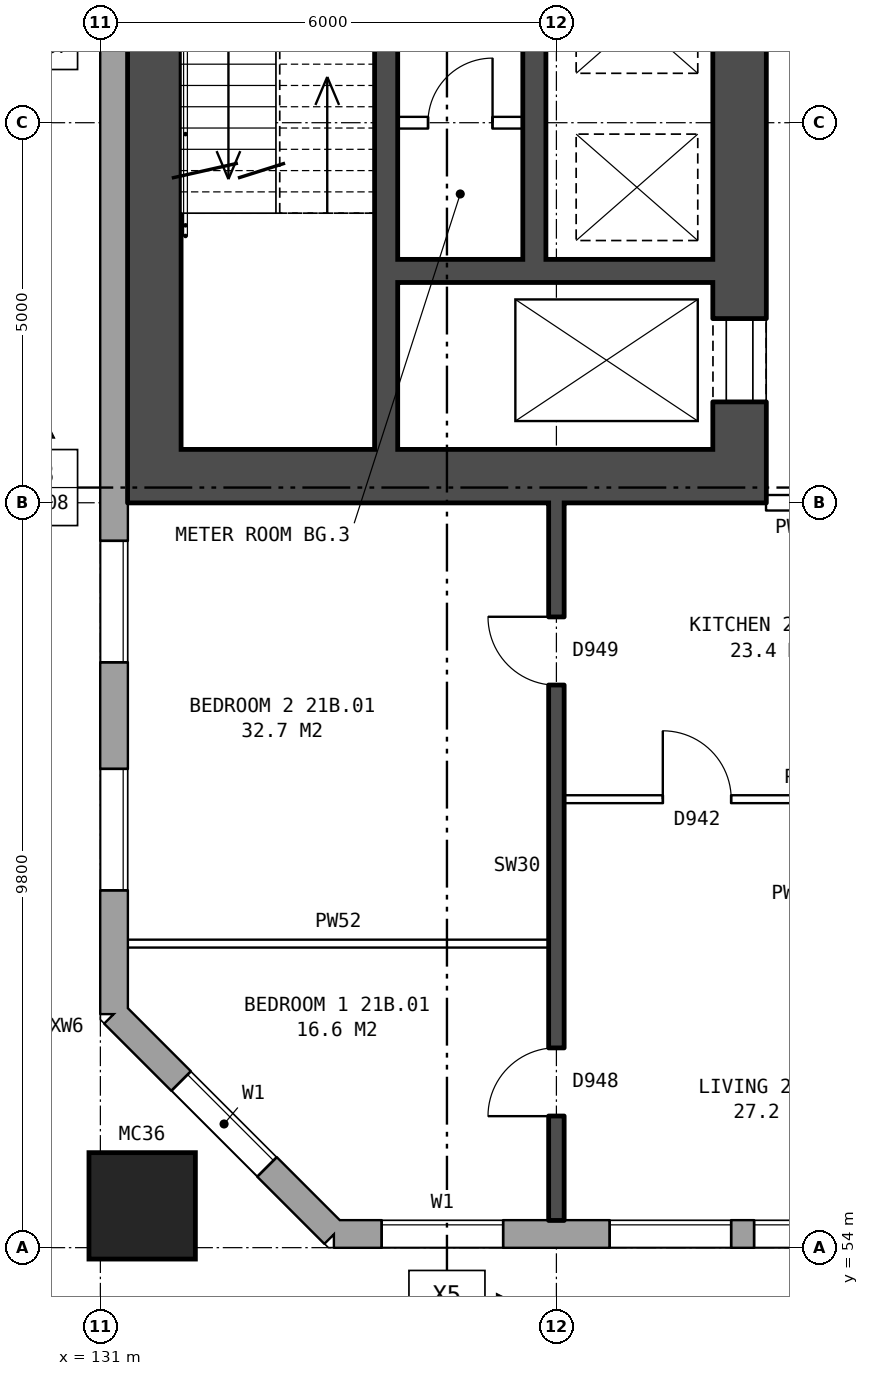
"""IFC4 building model, lengths in metres.
Left out: names, types, materials, properties, quantities, classifications, styles, units other than length and angle.
Written with IfcOpenShell. Run it as: python <this file> out.ifc"""

import sys

from ifc_helpers import new_model, si_unit, direction, frame, frame_2d, origin, origin_2d, place, context, subcontext, project, spatial, rectangle, hollow_rectangle, extrude, element, fill, save


model = new_model("IFC4")
c1 = context("Model", 3, precision=1e-05, world=origin(), true_north=direction((0.0, 1.0)))
c2 = subcontext(c1, "Body", "Model", "MODEL_VIEW")
j1 = project(units=[si_unit("LENGTHUNIT", "METRE"), si_unit("PLANEANGLEUNIT", "RADIAN")], contexts=[c1])
p1 = place(None, origin())
s1 = spatial("IfcSite", under=j1, at=p1, CompositionType="ELEMENT")
p2 = place(p1, origin())
s2 = spatial("IfcBuilding", under=s1, at=p2, CompositionType="ELEMENT")
p3 = place(p2, frame((0.0, 0.0, 77.8)))
s3 = spatial("IfcBuildingStorey", under=s2, at=p3, CompositionType="ELEMENT", Elevation=77.8)
p4 = place(p3, frame((131.55, 54.55, 0.0), z_axis=(0.0, 0.0, 1.0), x_axis=(1.0, 0.0, 0.0)))
e1 = element("IfcColumn", 1, at=p4, inside=s3, PredefinedType="COLUMN", context=c2, shape_type="SweptSolid", body=[
    extrude(hollow_rectangle(XDim=1.4, YDim=1.4, WallThickness=0.075, at=origin_2d()), origin(), (0.0, 0.0, 1.0), 3.1),
])
p5 = place(p3, frame((131.18, 57.075, 0.0), z_axis=(0.0, 0.0, 1.0), x_axis=(0.707106781187, -0.707106781187, 0.0)))
e2 = element("IfcWall", 2, at=p5, inside=s3, PredefinedType="STANDARD", context=c2, shape_type="SweptSolid", body=[
    extrude(rectangle(XDim=4.094, YDim=0.36, at=frame_2d((2.047, 0.0))), origin(), (0.0, 0.0, 1.0), 2.85),
])
p6 = place(p5, frame((1.247, 0.0, 0.8)))
e3 = element("IfcOpeningElement", 3, at=p6, cuts=e2, PredefinedType="OPENING", context=c2, shape_type="SweptSolid", body=[
    extrude(rectangle(XDim=1.6, YDim=1.8, at=frame_2d((0.8, 0.9))), frame((0.0, 0.19, 0.0), z_axis=(0.0, -1.0, 0.0), x_axis=(1.0, 0.0, 0.0)), (0.0, 0.0, 1.0), 0.38),
])
p7 = place(p3, frame((134.075, 54.18, 0.0), z_axis=(0.0, 0.0, 1.0), x_axis=(1.0, 0.0, 0.0)))
e4 = element("IfcWall", 4, at=p7, inside=s3, PredefinedType="STANDARD", context=c2, shape_type="SweptSolid", body=[
    extrude(rectangle(XDim=38.101, YDim=0.36, at=frame_2d((19.05, 0.0))), origin(), (0.0, 0.0, 1.0), 2.85),
])
p8 = place(p7, frame((0.625, 0.0, 0.8)))
e5 = element("IfcOpeningElement", 5, at=p8, cuts=e4, PredefinedType="OPENING", context=c2, shape_type="SweptSolid", body=[
    extrude(rectangle(XDim=1.6, YDim=1.8, at=frame_2d((0.8, 0.9))), frame((0.0, 0.19, 0.0), z_axis=(0.0, -1.0, 0.0), x_axis=(1.0, 0.0, 0.0)), (0.0, 0.0, 1.0), 0.38),
])
p9 = place(p7, frame((3.625, 0.0, 0.8)))
e6 = element("IfcOpeningElement", 6, at=p9, cuts=e4, PredefinedType="OPENING", context=c2, shape_type="SweptSolid", body=[
    extrude(rectangle(XDim=1.6, YDim=1.8, at=frame_2d((0.8, 0.9))), frame((0.0, 0.19, 0.0), z_axis=(0.0, -1.0, 0.0), x_axis=(1.0, 0.0, 0.0)), (0.0, 0.0, 1.0), 0.38),
])
p10 = place(p7, frame((5.525, 0.0, 0.8)))
e7 = element("IfcOpeningElement", 7, at=p10, cuts=e4, PredefinedType="OPENING", context=c2, shape_type="SweptSolid", body=[
    extrude(rectangle(XDim=1.6, YDim=1.8, at=frame_2d((0.8, 0.9))), frame((0.0, 0.19, 0.0), z_axis=(0.0, -1.0, 0.0), x_axis=(1.0, 0.0, 0.0)), (0.0, 0.0, 1.0), 0.38),
])
p11 = place(p7, frame((9.425, 0.0, 0.65)))
e8 = element("IfcOpeningElement", 8, at=p11, cuts=e4, PredefinedType="OPENING", context=c2, shape_type="SweptSolid", body=[
    extrude(rectangle(XDim=0.6, YDim=0.9, at=frame_2d((0.3, 0.45))), frame((0.0, 0.19, 0.0), z_axis=(0.0, -1.0, 0.0), x_axis=(1.0, 0.0, 0.0)), (0.0, 0.0, 1.0), 0.38),
])
p12 = place(p7, frame((12.625, 0.0, 0.8)))
e9 = element("IfcOpeningElement", 9, at=p12, cuts=e4, PredefinedType="OPENING", context=c2, shape_type="SweptSolid", body=[
    extrude(rectangle(XDim=1.6, YDim=1.8, at=frame_2d((0.8, 0.9))), frame((0.0, 0.19, 0.0), z_axis=(0.0, -1.0, 0.0), x_axis=(1.0, 0.0, 0.0)), (0.0, 0.0, 1.0), 0.38),
])
p13 = place(p7, frame((15.625, 0.0, 0.8)))
e10 = element("IfcOpeningElement", 10, at=p13, cuts=e4, PredefinedType="OPENING", context=c2, shape_type="SweptSolid", body=[
    extrude(rectangle(XDim=1.6, YDim=1.8, at=frame_2d((0.8, 0.9))), frame((0.0, 0.19, 0.0), z_axis=(0.0, -1.0, 0.0), x_axis=(1.0, 0.0, 0.0)), (0.0, 0.0, 1.0), 0.38),
])
p14 = place(p7, frame((18.625, 0.0, 0.8)))
e11 = element("IfcOpeningElement", 11, at=p14, cuts=e4, PredefinedType="OPENING", context=c2, shape_type="SweptSolid", body=[
    extrude(rectangle(XDim=1.6, YDim=1.8, at=frame_2d((0.8, 0.9))), frame((0.0, 0.19, 0.0), z_axis=(0.0, -1.0, 0.0), x_axis=(1.0, 0.0, 0.0)), (0.0, 0.0, 1.0), 0.38),
])
p15 = place(p7, frame((21.625, 0.0, 0.8)))
e12 = element("IfcOpeningElement", 12, at=p15, cuts=e4, PredefinedType="OPENING", context=c2, shape_type="SweptSolid", body=[
    extrude(rectangle(XDim=1.6, YDim=1.8, at=frame_2d((0.8, 0.9))), frame((0.0, 0.19, 0.0), z_axis=(0.0, -1.0, 0.0), x_axis=(1.0, 0.0, 0.0)), (0.0, 0.0, 1.0), 0.38),
])
p16 = place(p7, frame((24.625, 0.0, 0.8)))
e13 = element("IfcOpeningElement", 13, at=p16, cuts=e4, PredefinedType="OPENING", context=c2, shape_type="SweptSolid", body=[
    extrude(rectangle(XDim=1.6, YDim=1.8, at=frame_2d((0.8, 0.9))), frame((0.0, 0.19, 0.0), z_axis=(0.0, -1.0, 0.0), x_axis=(1.0, 0.0, 0.0)), (0.0, 0.0, 1.0), 0.38),
])
p17 = place(p7, frame((27.125, 0.0, 0.8)))
e14 = element("IfcOpeningElement", 14, at=p17, cuts=e4, PredefinedType="OPENING", context=c2, shape_type="SweptSolid", body=[
    extrude(rectangle(XDim=1.4, YDim=0.9, at=frame_2d((0.7, 0.45))), frame((0.0, 0.19, 0.0), z_axis=(0.0, -1.0, 0.0), x_axis=(1.0, 0.0, 0.0)), (0.0, 0.0, 1.0), 0.38),
])
p18 = place(p7, frame((30.625, 0.0, 0.8)))
e15 = element("IfcOpeningElement", 15, at=p18, cuts=e4, PredefinedType="OPENING", context=c2, shape_type="SweptSolid", body=[
    extrude(rectangle(XDim=1.6, YDim=1.8, at=frame_2d((0.8, 0.9))), frame((0.0, 0.19, 0.0), z_axis=(0.0, -1.0, 0.0), x_axis=(1.0, 0.0, 0.0)), (0.0, 0.0, 1.0), 0.38),
])
p19 = place(p7, frame((33.625, 0.0, 0.8)))
e16 = element("IfcOpeningElement", 16, at=p19, cuts=e4, PredefinedType="OPENING", context=c2, shape_type="SweptSolid", body=[
    extrude(rectangle(XDim=1.6, YDim=1.8, at=frame_2d((0.8, 0.9))), frame((0.0, 0.19, 0.0), z_axis=(0.0, -1.0, 0.0), x_axis=(1.0, 0.0, 0.0)), (0.0, 0.0, 1.0), 0.38),
])
p20 = place(p7, frame((7.425, 0.0, 1.3)))
e17 = element("IfcOpeningElement", 17, at=p20, cuts=e4, PredefinedType="OPENING", context=c2, shape_type="SweptSolid", body=[
    extrude(rectangle(XDim=0.6, YDim=1.2, at=frame_2d((0.3, 0.6))), frame((0.0, 0.19, 0.0), z_axis=(0.0, -1.0, 0.0), x_axis=(1.0, 0.0, 0.0)), (0.0, 0.0, 1.0), 0.38),
])
p21 = place(p7, frame((10.325, 0.0, 0.65)))
e18 = element("IfcOpeningElement", 18, at=p21, cuts=e4, PredefinedType="OPENING", context=c2, shape_type="SweptSolid", body=[
    extrude(rectangle(XDim=1.4, YDim=1.8, at=frame_2d((0.7, 0.9))), frame((0.0, 0.19, 0.0), z_axis=(0.0, -1.0, 0.0), x_axis=(1.0, 0.0, 0.0)), (0.0, 0.0, 1.0), 0.38),
])
p22 = place(p7, frame((29.675, 0.0, 1.7)))
e19 = element("IfcOpeningElement", 19, at=p22, cuts=e4, PredefinedType="OPENING", context=c2, shape_type="SweptSolid", body=[
    extrude(rectangle(XDim=0.6, YDim=0.9, at=frame_2d((0.3, 0.45))), frame((0.0, 0.19, 0.0), z_axis=(0.0, -1.0, 0.0), x_axis=(1.0, 0.0, 0.0)), (0.0, 0.0, 1.0), 0.38),
])
p23 = place(p3, frame((131.18, 82.925, 0.0), z_axis=(0.0, 0.0, 1.0), x_axis=(0.0, -1.0, 0.0)))
e20 = element("IfcWall", 20, at=p23, inside=s3, PredefinedType="STANDARD", context=c2, shape_type="SweptSolid", body=[
    extrude(rectangle(XDim=25.851, YDim=0.36, at=frame_2d((12.925, 0.0))), origin(), (0.0, 0.0, 1.0), 2.85),
])
p24 = place(p23, frame((1.625, 0.0, 0.8)))
e21 = element("IfcOpeningElement", 21, at=p24, cuts=e20, PredefinedType="OPENING", context=c2, shape_type="SweptSolid", body=[
    extrude(rectangle(XDim=1.6, YDim=1.8, at=frame_2d((0.8, 0.9))), frame((0.0, 0.19, 0.0), z_axis=(0.0, -1.0, 0.0), x_axis=(1.0, 0.0, 0.0)), (0.0, 0.0, 1.0), 0.38),
])
p25 = place(p23, frame((4.625, 0.0, 0.8)))
e22 = element("IfcOpeningElement", 22, at=p25, cuts=e20, PredefinedType="OPENING", context=c2, shape_type="SweptSolid", body=[
    extrude(rectangle(XDim=1.6, YDim=1.8, at=frame_2d((0.8, 0.9))), frame((0.0, 0.19, 0.0), z_axis=(0.0, -1.0, 0.0), x_axis=(1.0, 0.0, 0.0)), (0.0, 0.0, 1.0), 0.38),
])
p26 = place(p23, frame((19.625, 0.0, 0.8)))
e23 = element("IfcOpeningElement", 23, at=p26, cuts=e20, PredefinedType="OPENING", context=c2, shape_type="SweptSolid", body=[
    extrude(rectangle(XDim=1.6, YDim=1.8, at=frame_2d((0.8, 0.9))), frame((0.0, 0.19, 0.0), z_axis=(0.0, -1.0, 0.0), x_axis=(1.0, 0.0, 0.0)), (0.0, 0.0, 1.0), 0.38),
])
p27 = place(p23, frame((22.625, 0.0, 0.8)))
e24 = element("IfcOpeningElement", 24, at=p27, cuts=e20, PredefinedType="OPENING", context=c2, shape_type="SweptSolid", body=[
    extrude(rectangle(XDim=1.6, YDim=1.8, at=frame_2d((0.8, 0.9))), frame((0.0, 0.19, 0.0), z_axis=(0.0, -1.0, 0.0), x_axis=(1.0, 0.0, 0.0)), (0.0, 0.0, 1.0), 0.38),
])
p28 = place(p3, frame((139.41, 64.5, 0.0), z_axis=(0.0, 0.0, 1.0), x_axis=(0.0, 1.0, 0.0)))
e25 = element("IfcWall", 25, at=p28, inside=s3, PredefinedType="SHEAR", context=c2, shape_type="SweptSolid", body=[
    extrude(rectangle(XDim=11.0, YDim=0.7, at=frame_2d((5.5, 0.0))), origin(), (0.0, 0.0, 1.0), 2.85),
])
p29 = place(p28, frame((0.625, 0.0, 0.0)))
e26 = element("IfcOpeningElement", 26, at=p29, cuts=e25, PredefinedType="OPENING", context=c2, shape_type="SweptSolid", body=[
    extrude(rectangle(XDim=1.1, YDim=2.1, at=frame_2d((0.55, 1.05))), frame((0.0, 0.36, 0.0), z_axis=(0.0, -1.0, 0.0), x_axis=(1.0, 0.0, 0.0)), (0.0, 0.0, 1.0), 0.72),
])
p30 = place(p28, frame((9.2, 0.0, 0.0)))
e27 = element("IfcOpeningElement", 27, at=p30, cuts=e25, PredefinedType="OPENING", context=c2, shape_type="SweptSolid", body=[
    extrude(rectangle(XDim=1.1, YDim=2.1, at=frame_2d((0.55, 1.05))), frame((0.0, 0.36, 0.0), z_axis=(0.0, -1.0, 0.0), x_axis=(1.0, 0.0, 0.0)), (0.0, 0.0, 1.0), 0.72),
])
p31 = place(p28, frame((7.425, 0.0, 0.0)))
e28 = element("IfcOpeningElement", 28, at=p31, cuts=e25, PredefinedType="OPENING", context=c2, shape_type="SweptSolid", body=[
    extrude(rectangle(XDim=0.85, YDim=2.1, at=frame_2d((0.425, 1.05))), frame((0.0, 0.36, 0.0), z_axis=(0.0, -1.0, 0.0), x_axis=(1.0, 0.0, 0.0)), (0.0, 0.0, 1.0), 0.72),
])
p32 = place(p3, frame((131.71, 64.5, 0.0), z_axis=(0.0, 0.0, 1.0), x_axis=(0.0, 1.0, 0.0)))
e29 = element("IfcWall", 29, at=p32, inside=s3, PredefinedType="SHEAR", context=c2, shape_type="SweptSolid", body=[
    extrude(rectangle(XDim=11.0, YDim=0.7, at=frame_2d((5.5, 0.0))), origin(), (0.0, 0.0, 1.0), 2.85),
])
p33 = place(p3, frame((139.76, 64.15, 0.0), z_axis=(0.0, 0.0, 1.0), x_axis=(-1.0, 0.0, 0.0)))
e30 = element("IfcWall", 30, at=p33, inside=s3, PredefinedType="SHEAR", context=c2, shape_type="SweptSolid", body=[
    extrude(rectangle(XDim=8.4, YDim=0.7, at=frame_2d((4.2, 0.0))), origin(), (0.0, 0.0, 1.0), 2.85),
])
p34 = place(p3, frame((139.06, 66.85, 0.0), z_axis=(0.0, 0.0, 1.0), x_axis=(-1.0, 0.0, 0.0)))
e31 = element("IfcWall", 31, at=p34, inside=s3, PredefinedType="SHEAR", context=c2, shape_type="SweptSolid", body=[
    extrude(rectangle(XDim=4.15, YDim=0.3, at=frame_2d((2.075, 0.0))), origin(), (0.0, 0.0, 1.0), 2.85),
])
p35 = place(p3, frame((136.56, 68.8, 0.0), z_axis=(0.0, 0.0, 1.0), x_axis=(-1.0, 0.0, 0.0)))
e32 = element("IfcWall", 32, at=p35, inside=s3, PredefinedType="PARTITIONING", context=c2, shape_type="SweptSolid", body=[
    extrude(rectangle(XDim=1.65, YDim=0.15, at=frame_2d((0.825, 0.0))), origin(), (0.0, 0.0, 1.0), 2.85),
])
p36 = place(p35, frame((0.4, 0.0, 0.0)))
e33 = element("IfcOpeningElement", 33, at=p36, cuts=e32, PredefinedType="OPENING", context=c2, shape_type="SweptSolid", body=[
    extrude(rectangle(XDim=0.85, YDim=2.1, at=frame_2d((0.425, 1.05))), frame((0.0, 0.085, 0.0), z_axis=(0.0, -1.0, 0.0), x_axis=(1.0, 0.0, 0.0)), (0.0, 0.0, 1.0), 0.17),
])
p37 = place(p3, frame((136.71, 67.0, 0.0), z_axis=(0.0, 0.0, 1.0), x_axis=(0.0, 1.0, 0.0)))
e34 = element("IfcWall", 34, at=p37, inside=s3, PredefinedType="SHEAR", context=c2, shape_type="SweptSolid", body=[
    extrude(rectangle(XDim=4.1, YDim=0.3, at=frame_2d((2.05, 0.0))), origin(), (0.0, 0.0, 1.0), 2.85),
])
p38 = place(p3, frame((134.76, 64.5, 0.0), z_axis=(0.0, 0.0, 1.0), x_axis=(0.0, 1.0, 0.0)))
e35 = element("IfcWall", 35, at=p38, inside=s3, PredefinedType="SHEAR", context=c2, shape_type="SweptSolid", body=[
    extrude(rectangle(XDim=6.6, YDim=0.3, at=frame_2d((3.3, 0.0))), origin(), (0.0, 0.0, 1.0), 2.85),
])
p39 = place(p3, frame((131.36, 58.0, 0.0), z_axis=(0.0, 0.0, 1.0), x_axis=(1.0, 0.0, 0.0)))
e36 = element("IfcWall", 36, at=p39, inside=s3, PredefinedType="PARTITIONING", context=c2, shape_type="SweptSolid", body=[
    extrude(rectangle(XDim=5.54, YDim=0.1, at=frame_2d((2.77, 0.0))), origin(), (0.0, 0.0, 1.0), 2.85),
])
p40 = place(p3, frame((137.1, 59.9, 0.0), z_axis=(0.0, 0.0, 1.0), x_axis=(1.0, 0.0, 0.0)))
e37 = element("IfcWall", 37, at=p40, inside=s3, PredefinedType="PARTITIONING", context=c2, shape_type="SweptSolid", body=[
    extrude(rectangle(XDim=5.8, YDim=0.1, at=frame_2d((2.9, 0.0))), origin(), (0.0, 0.0, 1.0), 2.85),
])
p41 = place(p40, frame((1.3, 0.0, 0.0)))
e38 = element("IfcOpeningElement", 38, at=p41, cuts=e37, PredefinedType="OPENING", context=c2, shape_type="SweptSolid", body=[
    extrude(rectangle(XDim=0.9, YDim=2.1, at=frame_2d((0.45, 1.05))), frame((0.0, 0.06, 0.0), z_axis=(0.0, -1.0, 0.0), x_axis=(1.0, 0.0, 0.0)), (0.0, 0.0, 1.0), 0.12),
])
p42 = place(p40, frame((4.2, 0.0, 0.0)))
e39 = element("IfcOpeningElement", 39, at=p42, cuts=e37, PredefinedType="OPENING", context=c2, shape_type="SweptSolid", body=[
    extrude(rectangle(XDim=0.9, YDim=2.1, at=frame_2d((0.45, 1.05))), frame((0.0, 0.06, 0.0), z_axis=(0.0, -1.0, 0.0), x_axis=(1.0, 0.0, 0.0)), (0.0, 0.0, 1.0), 0.12),
])
p43 = place(p3, frame((139.76, 63.8, 0.0), z_axis=(0.0, 0.0, 1.0), x_axis=(1.0, 0.0, 0.0)))
e40 = element("IfcWall", 40, at=p43, inside=s3, PredefinedType="PARTITIONING", context=c2, shape_type="SweptSolid", body=[
    extrude(rectangle(XDim=3.0, YDim=0.2, at=frame_2d((1.5, 0.0))), origin(), (0.0, 0.0, 1.0), 2.85),
])
p44 = place(p43, frame((1.0, 0.0, 0.0)))
e41 = element("IfcOpeningElement", 41, at=p44, cuts=e40, PredefinedType="OPENING", context=c2, shape_type="SweptSolid", body=[
    extrude(rectangle(XDim=1.0, YDim=2.1, at=frame_2d((0.5, 1.05))), frame((0.0, 0.11, 0.0), z_axis=(0.0, -1.0, 0.0), x_axis=(1.0, 0.0, 0.0)), (0.0, 0.0, 1.0), 0.22),
])
p45 = place(p3, frame((137.0, 54.36, 0.0), z_axis=(0.0, 0.0, 1.0), x_axis=(0.0, 1.0, 0.0)))
e42 = element("IfcWall", 42, at=p45, inside=s3, PredefinedType="SOLIDWALL", context=c2, shape_type="SweptSolid", body=[
    extrude(rectangle(XDim=9.44, YDim=0.2, at=frame_2d((4.72, 0.0))), origin(), (0.0, 0.0, 1.0), 2.85),
])
p46 = place(p45, frame((1.37, 0.0, 0.0)))
e43 = element("IfcOpeningElement", 43, at=p46, cuts=e42, PredefinedType="OPENING", context=c2, shape_type="SweptSolid", body=[
    extrude(rectangle(XDim=0.9, YDim=2.1, at=frame_2d((0.45, 1.05))), frame((0.0, 0.11, 0.0), z_axis=(0.0, -1.0, 0.0), x_axis=(1.0, 0.0, 0.0)), (0.0, 0.0, 1.0), 0.22),
])
p47 = place(p45, frame((7.04, 0.0, 0.0)))
e44 = element("IfcOpeningElement", 44, at=p47, cuts=e42, PredefinedType="OPENING", context=c2, shape_type="SweptSolid", body=[
    extrude(rectangle(XDim=0.9, YDim=2.1, at=frame_2d((0.45, 1.05))), frame((0.0, 0.11, 0.0), z_axis=(0.0, -1.0, 0.0), x_axis=(1.0, 0.0, 0.0)), (0.0, 0.0, 1.0), 0.22),
])
p48 = place(p6, origin())
e45 = element("IfcWindow", 45, at=p48, inside=s3, PartitioningType="SINGLE_PANEL", PredefinedType="WINDOW", context=c2, shape_type="SweptSolid", body=[
    extrude(rectangle(XDim=1.6, YDim=1.8, at=frame_2d((0.8, 0.9))), frame((0.0, 0.15, 0.0), z_axis=(0.0, -1.0, 0.0), x_axis=(1.0, 0.0, 0.0)), (0.0, 0.0, 1.0), 0.06),
])
fill(e3, e45)
p49 = place(p8, origin())
e46 = element("IfcWindow", 46, at=p49, inside=s3, PartitioningType="SINGLE_PANEL", PredefinedType="WINDOW", context=c2, shape_type="SweptSolid", body=[
    extrude(rectangle(XDim=1.6, YDim=1.8, at=frame_2d((0.8, 0.9))), frame((0.0, 0.15, 0.0), z_axis=(0.0, -1.0, 0.0), x_axis=(1.0, 0.0, 0.0)), (0.0, 0.0, 1.0), 0.06),
])
fill(e5, e46)
p50 = place(p9, origin())
e47 = element("IfcWindow", 47, at=p50, inside=s3, PartitioningType="SINGLE_PANEL", PredefinedType="WINDOW", context=c2, shape_type="SweptSolid", body=[
    extrude(rectangle(XDim=1.6, YDim=1.8, at=frame_2d((0.8, 0.9))), frame((0.0, 0.15, 0.0), z_axis=(0.0, -1.0, 0.0), x_axis=(1.0, 0.0, 0.0)), (0.0, 0.0, 1.0), 0.06),
])
fill(e6, e47)
p51 = place(p10, origin())
e48 = element("IfcWindow", 48, at=p51, inside=s3, PartitioningType="SINGLE_PANEL", PredefinedType="WINDOW", context=c2, shape_type="SweptSolid", body=[
    extrude(rectangle(XDim=1.6, YDim=1.8, at=frame_2d((0.8, 0.9))), frame((0.0, 0.15, 0.0), z_axis=(0.0, -1.0, 0.0), x_axis=(1.0, 0.0, 0.0)), (0.0, 0.0, 1.0), 0.06),
])
fill(e7, e48)
p52 = place(p26, origin())
e49 = element("IfcWindow", 49, at=p52, inside=s3, PartitioningType="SINGLE_PANEL", PredefinedType="WINDOW", context=c2, shape_type="SweptSolid", body=[
    extrude(rectangle(XDim=1.6, YDim=1.8, at=frame_2d((0.8, 0.9))), frame((0.0, 0.15, 0.0), z_axis=(0.0, -1.0, 0.0), x_axis=(1.0, 0.0, 0.0)), (0.0, 0.0, 1.0), 0.06),
])
fill(e23, e49)
p53 = place(p27, origin())
e50 = element("IfcWindow", 50, at=p53, inside=s3, PartitioningType="SINGLE_PANEL", PredefinedType="WINDOW", context=c2, shape_type="SweptSolid", body=[
    extrude(rectangle(XDim=1.6, YDim=1.8, at=frame_2d((0.8, 0.9))), frame((0.0, 0.15, 0.0), z_axis=(0.0, -1.0, 0.0), x_axis=(1.0, 0.0, 0.0)), (0.0, 0.0, 1.0), 0.06),
])
fill(e24, e50)
p54 = place(p29, origin())
e51 = element("IfcDoor", 51, at=p54, inside=s3, OperationType="DOUBLE_DOOR_SLIDING", PredefinedType="DOOR", context=c2, shape_type="SweptSolid", body=[
    extrude(rectangle(XDim=1.1, YDim=2.1, at=frame_2d((0.55, 1.05))), frame((0.0, 0.335, 0.0), z_axis=(0.0, -1.0, 0.0), x_axis=(1.0, 0.0, 0.0)), (0.0, 0.0, 1.0), 0.05),
])
fill(e26, e51)
p55 = place(p36, frame((0.85, 0.0, 0.0), z_axis=(0.0, 0.0, 1.0), x_axis=(-1.0, 0.0, 0.0)))
e52 = element("IfcDoor", 52, at=p55, inside=s3, OperationType="SINGLE_SWING_RIGHT", PredefinedType="DOOR", context=c2, shape_type="SweptSolid", body=[
    extrude(rectangle(XDim=0.85, YDim=2.1, at=frame_2d((0.425, 1.05))), frame((0.0, 0.025, 0.0), z_axis=(0.0, -1.0, 0.0), x_axis=(1.0, 0.0, 0.0)), (0.0, 0.0, 1.0), 0.05),
])
fill(e33, e52)
p56 = place(p46, origin())
e53 = element("IfcDoor", 53, at=p56, inside=s3, OperationType="SINGLE_SWING_LEFT", PredefinedType="DOOR", context=c2, shape_type="SweptSolid", body=[
    extrude(rectangle(XDim=0.9, YDim=2.1, at=frame_2d((0.45, 1.05))), frame((0.0, 0.025, 0.0), z_axis=(0.0, -1.0, 0.0), x_axis=(1.0, 0.0, 0.0)), (0.0, 0.0, 1.0), 0.05),
])
fill(e43, e53)
p57 = place(p47, origin())
e54 = element("IfcDoor", 54, at=p57, inside=s3, OperationType="SINGLE_SWING_RIGHT", PredefinedType="DOOR", context=c2, shape_type="SweptSolid", body=[
    extrude(rectangle(XDim=0.9, YDim=2.1, at=frame_2d((0.45, 1.05))), frame((0.0, 0.025, 0.0), z_axis=(0.0, -1.0, 0.0), x_axis=(1.0, 0.0, 0.0)), (0.0, 0.0, 1.0), 0.05),
])
fill(e44, e54)
p58 = place(p41, origin())
e55 = element("IfcDoor", 55, at=p58, inside=s3, OperationType="SINGLE_SWING_LEFT", PredefinedType="DOOR", context=c2, shape_type="SweptSolid", body=[
    extrude(rectangle(XDim=0.9, YDim=2.1, at=frame_2d((0.45, 1.05))), frame((0.0, 0.025, 0.0), z_axis=(0.0, -1.0, 0.0), x_axis=(1.0, 0.0, 0.0)), (0.0, 0.0, 1.0), 0.05),
])
fill(e38, e55)
save(model, sys.argv[1])
